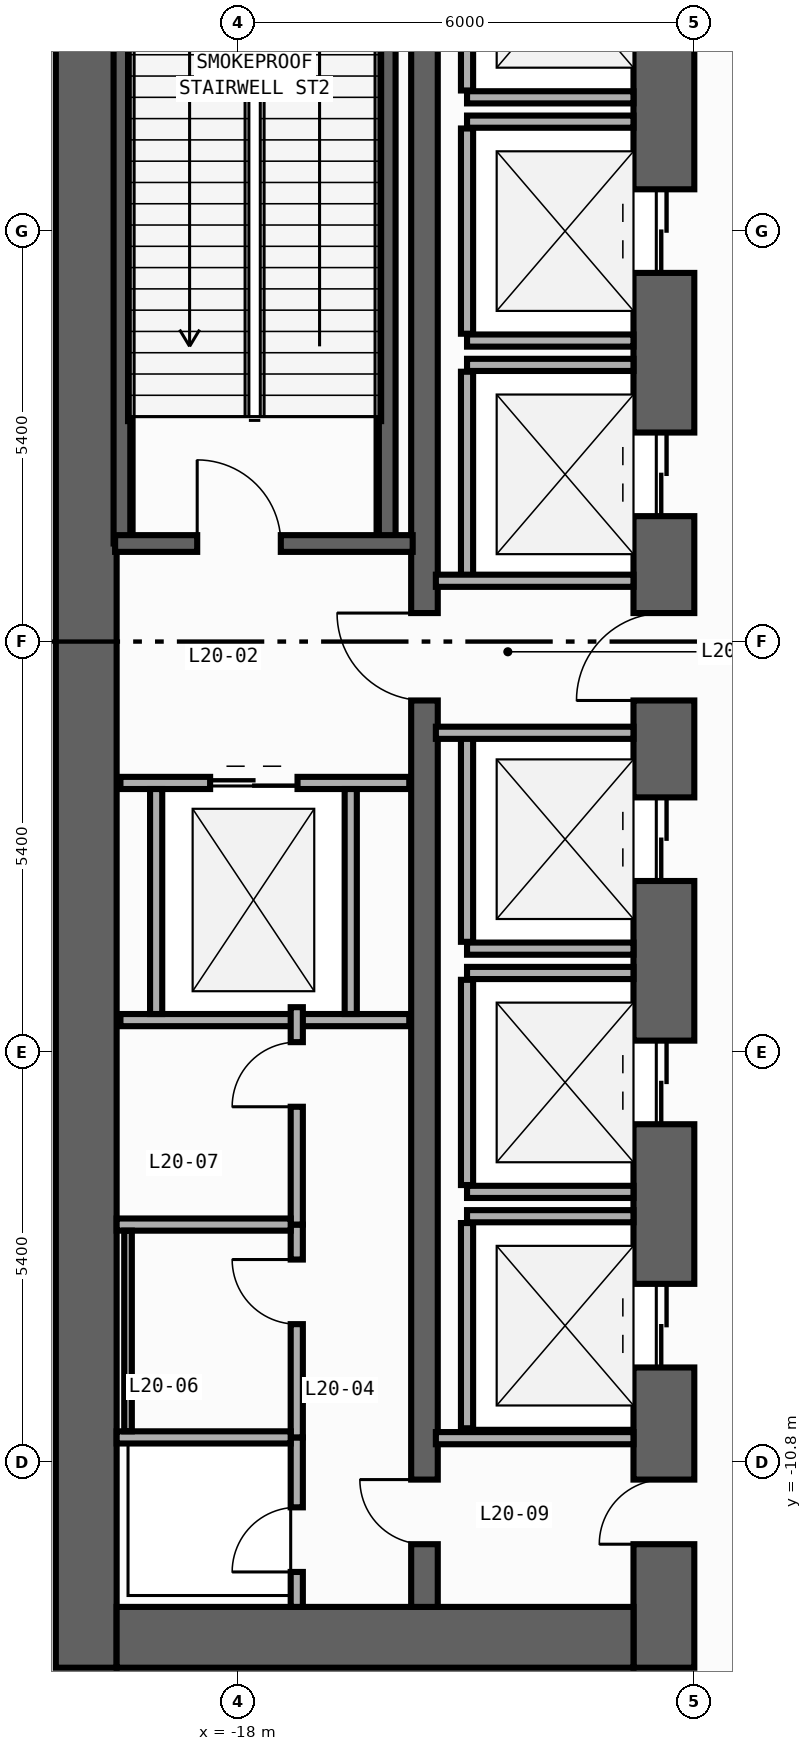
"""IFC4 building model, lengths in metres.
Left out: names, types, materials, properties, quantities, classifications, styles, units other than length and angle.
Written with IfcOpenShell. Run it as: python <this file> out.ifc"""

import sys

from ifc_helpers import new_model, si_unit, direction, frame, frame_2d, origin, place, context, subcontext, project, spatial, rectangle, extrude, element, fill, save


model = new_model("IFC4")
c1 = context("Model", 3, precision=1e-05, world=origin(), true_north=direction((0.0, 1.0)))
c2 = subcontext(c1, "Body", "Model", "MODEL_VIEW")
j1 = project(units=[si_unit("LENGTHUNIT", "METRE"), si_unit("PLANEANGLEUNIT", "RADIAN")], contexts=[c1])
p1 = place(None, origin())
s1 = spatial("IfcSite", under=j1, at=p1, CompositionType="ELEMENT")
p2 = place(p1, origin())
s2 = spatial("IfcBuilding", under=s1, at=p2, CompositionType="ELEMENT")
p3 = place(p2, frame((0.0, 0.0, 84.8)))
s3 = spatial("IfcBuildingStorey", under=s2, at=p3, CompositionType="ELEMENT", Elevation=84.8)
p4 = place(p3, frame((-20.0, -13.5, 0.0), z_axis=(0.0, 0.0, 1.0), x_axis=(0.0, 1.0, 0.0)))
e1 = element("IfcWall", 1, at=p4, inside=s3, PredefinedType="SHEAR", context=c2, shape_type="SweptSolid", body=[
    extrude(rectangle(XDim=27.0, YDim=0.8, at=frame_2d((13.5, 0.0))), origin(), (0.0, 0.0, 1.0), 8.14),
])
p5 = place(p3, frame((-12.4, -13.5, 0.0), z_axis=(0.0, 0.0, 1.0), x_axis=(0.0, 1.0, 0.0)))
e2 = element("IfcWall", 2, at=p5, inside=s3, PredefinedType="SHEAR", context=c2, shape_type="SweptSolid", body=[
    extrude(rectangle(XDim=27.0, YDim=0.8, at=frame_2d((13.5, 0.0))), origin(), (0.0, 0.0, 1.0), 8.14),
])
p6 = place(p5, frame((21.55, 0.0, 0.0)))
e3 = element("IfcOpeningElement", 3, at=p6, cuts=e2, PredefinedType="OPENING", context=c2, shape_type="SweptSolid", body=[
    extrude(rectangle(XDim=1.1, YDim=2.2, at=frame_2d((0.55, 1.1))), frame((0.0, 0.41, 0.0), z_axis=(0.0, -1.0, 0.0), x_axis=(1.0, 0.0, 0.0)), (0.0, 0.0, 1.0), 0.82),
])
p7 = place(p5, frame((18.35, 0.0, 0.0)))
e4 = element("IfcOpeningElement", 4, at=p7, cuts=e2, PredefinedType="OPENING", context=c2, shape_type="SweptSolid", body=[
    extrude(rectangle(XDim=1.1, YDim=2.2, at=frame_2d((0.55, 1.1))), frame((0.0, 0.41, 0.0), z_axis=(0.0, -1.0, 0.0), x_axis=(1.0, 0.0, 0.0)), (0.0, 0.0, 1.0), 0.82),
])
p8 = place(p5, frame((15.15, 0.0, 0.0)))
e5 = element("IfcOpeningElement", 5, at=p8, cuts=e2, PredefinedType="OPENING", context=c2, shape_type="SweptSolid", body=[
    extrude(rectangle(XDim=1.1, YDim=2.2, at=frame_2d((0.55, 1.1))), frame((0.0, 0.41, 0.0), z_axis=(0.0, -1.0, 0.0), x_axis=(1.0, 0.0, 0.0)), (0.0, 0.0, 1.0), 0.82),
])
p9 = place(p5, frame((10.35, 0.0, 0.0)))
e6 = element("IfcOpeningElement", 6, at=p9, cuts=e2, PredefinedType="OPENING", context=c2, shape_type="SweptSolid", body=[
    extrude(rectangle(XDim=1.1, YDim=2.2, at=frame_2d((0.55, 1.1))), frame((0.0, 0.41, 0.0), z_axis=(0.0, -1.0, 0.0), x_axis=(1.0, 0.0, 0.0)), (0.0, 0.0, 1.0), 0.82),
])
p10 = place(p5, frame((7.15, 0.0, 0.0)))
e7 = element("IfcOpeningElement", 7, at=p10, cuts=e2, PredefinedType="OPENING", context=c2, shape_type="SweptSolid", body=[
    extrude(rectangle(XDim=1.1, YDim=2.2, at=frame_2d((0.55, 1.1))), frame((0.0, 0.41, 0.0), z_axis=(0.0, -1.0, 0.0), x_axis=(1.0, 0.0, 0.0)), (0.0, 0.0, 1.0), 0.82),
])
p11 = place(p5, frame((3.95, 0.0, 0.0)))
e8 = element("IfcOpeningElement", 8, at=p11, cuts=e2, PredefinedType="OPENING", context=c2, shape_type="SweptSolid", body=[
    extrude(rectangle(XDim=1.1, YDim=2.2, at=frame_2d((0.55, 1.1))), frame((0.0, 0.41, 0.0), z_axis=(0.0, -1.0, 0.0), x_axis=(1.0, 0.0, 0.0)), (0.0, 0.0, 1.0), 0.82),
])
p12 = place(p5, frame((12.725, 0.0, 0.0)))
e9 = element("IfcOpeningElement", 9, at=p12, cuts=e2, PredefinedType="OPENING", context=c2, shape_type="SweptSolid", body=[
    extrude(rectangle(XDim=1.15, YDim=2.2, at=frame_2d((0.575, 1.1))), frame((0.0, 0.41, 0.0), z_axis=(0.0, -1.0, 0.0), x_axis=(1.0, 0.0, 0.0)), (0.0, 0.0, 1.0), 0.82),
])
p13 = place(p5, frame((1.625, 0.0, 0.0)))
e10 = element("IfcOpeningElement", 10, at=p13, cuts=e2, PredefinedType="OPENING", context=c2, shape_type="SweptSolid", body=[
    extrude(rectangle(XDim=0.85, YDim=2.1, at=frame_2d((0.425, 1.05))), frame((0.0, 0.41, 0.0), z_axis=(0.0, -1.0, 0.0), x_axis=(1.0, 0.0, 0.0)), (0.0, 0.0, 1.0), 0.82),
])
p14 = place(p3, frame((-19.6, -13.1, 0.0), z_axis=(0.0, 0.0, 1.0), x_axis=(1.0, 0.0, 0.0)))
e11 = element("IfcWall", 11, at=p14, inside=s3, PredefinedType="SHEAR", context=c2, shape_type="SweptSolid", body=[
    extrude(rectangle(XDim=6.8, YDim=0.8, at=frame_2d((3.4, 0.0))), origin(), (0.0, 0.0, 1.0), 8.14),
])
p15 = place(p3, frame((-15.55, -12.7, 0.0), z_axis=(0.0, 0.0, 1.0), x_axis=(0.0, 1.0, 0.0)))
e12 = element("IfcWall", 12, at=p15, inside=s3, PredefinedType="SHEAR", context=c2, shape_type="SweptSolid", body=[
    extrude(rectangle(XDim=25.4, YDim=0.35, at=frame_2d((12.7, 0.0))), origin(), (0.0, 0.0, 1.0), 8.14),
])
p16 = place(p15, frame((11.925, 0.0, 0.0)))
e13 = element("IfcOpeningElement", 13, at=p16, cuts=e12, PredefinedType="OPENING", context=c2, shape_type="SweptSolid", body=[
    extrude(rectangle(XDim=1.15, YDim=2.2, at=frame_2d((0.575, 1.1))), frame((0.0, 0.185, 0.0), z_axis=(0.0, -1.0, 0.0), x_axis=(1.0, 0.0, 0.0)), (0.0, 0.0, 1.0), 0.37),
])
p17 = place(p15, frame((0.825, 0.0, 0.0)))
e14 = element("IfcOpeningElement", 14, at=p17, cuts=e12, PredefinedType="OPENING", context=c2, shape_type="SweptSolid", body=[
    extrude(rectangle(XDim=0.85, YDim=2.1, at=frame_2d((0.425, 1.05))), frame((0.0, 0.185, 0.0), z_axis=(0.0, -1.0, 0.0), x_axis=(1.0, 0.0, 0.0)), (0.0, 0.0, 1.0), 0.37),
])
for number, where, z_axis, x_axis in (
    (15, (-16.04, 1.29, 0.0), (0.0, 0.0, 1.0), (0.0, 1.0, 0.0)),
    (16, (-19.53, 1.29, 0.0), (0.0, 0.0, 1.0), (0.0, 1.0, 0.0)),
):
    element("IfcWall", number, at=place(p3, frame(where, z_axis=z_axis, x_axis=x_axis)), inside=s3, PredefinedType="SHEAR", context=c2, shape_type="SweptSolid", body=[
        extrude(rectangle(XDim=11.3, YDim=0.22, at=frame_2d((5.65, 0.0))), origin(), (0.0, 0.0, 1.0), 8.14),
    ])
p18 = place(p3, frame((-19.62, 1.29, 0.0), z_axis=(0.0, 0.0, 1.0), x_axis=(1.0, 0.0, 0.0)))
e17 = element("IfcWall", 17, at=p18, inside=s3, PredefinedType="SHEAR", context=c2, shape_type="SweptSolid", body=[
    extrude(rectangle(XDim=3.915, YDim=0.22, at=frame_2d((1.958, 0.0))), origin(), (0.0, 0.0, 1.0), 8.14),
])
p19 = place(p18, frame((1.08, 0.0, 0.0)))
e18 = element("IfcOpeningElement", 18, at=p19, cuts=e17, PredefinedType="OPENING", context=c2, shape_type="SweptSolid", body=[
    extrude(rectangle(XDim=1.1, YDim=2.2, at=frame_2d((0.55, 1.1))), frame((0.0, 0.12, 0.0), z_axis=(0.0, -1.0, 0.0), x_axis=(1.0, 0.0, 0.0)), (0.0, 0.0, 1.0), 0.24),
])
p20 = place(p3, frame((-14.99, 7.16, 0.0), z_axis=(0.0, 0.0, 1.0), x_axis=(1.0, 0.0, 0.0)))
e19 = element("IfcWall", 19, at=p20, inside=s3, PredefinedType="STANDARD", context=c2, shape_type="SweptSolid", body=[
    extrude(rectangle(XDim=2.19, YDim=0.16, at=frame_2d((1.095, 0.0))), origin(), (0.0, 0.0, 1.0), 8.14),
])
p21 = place(p3, frame((-14.99, 7.25, 0.0), z_axis=(0.0, 0.0, 1.0), x_axis=(0.0, 1.0, 0.0)))
e20 = element("IfcWall", 20, at=p21, inside=s3, PredefinedType="STANDARD", context=c2, shape_type="SweptSolid", body=[
    extrude(rectangle(XDim=2.7, YDim=0.16, at=frame_2d((1.35, 0.0))), origin(), (0.0, 0.0, 1.0), 8.14),
])
for number, where, z_axis, x_axis in (
    (21, (-14.99, 3.96, 0.0), (0.0, 0.0, 1.0), (1.0, 0.0, 0.0)),
    (22, (-14.99, 6.84, 0.0), (0.0, 0.0, 1.0), (1.0, 0.0, 0.0)),
):
    element("IfcWall", number, at=place(p3, frame(where, z_axis=z_axis, x_axis=x_axis)), inside=s3, PredefinedType="STANDARD", context=c2, shape_type="SweptSolid", body=[
        extrude(rectangle(XDim=2.19, YDim=0.16, at=frame_2d((1.095, 0.0))), origin(), (0.0, 0.0, 1.0), 8.14),
    ])
p22 = place(p3, frame((-14.99, 4.05, 0.0), z_axis=(0.0, 0.0, 1.0), x_axis=(0.0, 1.0, 0.0)))
e23 = element("IfcWall", 23, at=p22, inside=s3, PredefinedType="STANDARD", context=c2, shape_type="SweptSolid", body=[
    extrude(rectangle(XDim=2.7, YDim=0.16, at=frame_2d((1.35, 0.0))), origin(), (0.0, 0.0, 1.0), 8.14),
])
p23 = place(p3, frame((-14.99, 3.64, 0.0), z_axis=(0.0, 0.0, 1.0), x_axis=(1.0, 0.0, 0.0)))
e24 = element("IfcWall", 24, at=p23, inside=s3, PredefinedType="STANDARD", context=c2, shape_type="SweptSolid", body=[
    extrude(rectangle(XDim=2.19, YDim=0.16, at=frame_2d((1.095, 0.0))), origin(), (0.0, 0.0, 1.0), 8.14),
])
p24 = place(p3, frame((-14.99, 0.85, 0.0), z_axis=(0.0, 0.0, 1.0), x_axis=(0.0, 1.0, 0.0)))
e25 = element("IfcWall", 25, at=p24, inside=s3, PredefinedType="STANDARD", context=c2, shape_type="SweptSolid", body=[
    extrude(rectangle(XDim=2.7, YDim=0.16, at=frame_2d((1.35, 0.0))), origin(), (0.0, 0.0, 1.0), 8.14),
])
p25 = place(p3, frame((-14.99, -4.04, 0.0), z_axis=(0.0, 0.0, 1.0), x_axis=(1.0, 0.0, 0.0)))
e26 = element("IfcWall", 26, at=p25, inside=s3, PredefinedType="STANDARD", context=c2, shape_type="SweptSolid", body=[
    extrude(rectangle(XDim=2.19, YDim=0.16, at=frame_2d((1.095, 0.0))), origin(), (0.0, 0.0, 1.0), 8.14),
])
p26 = place(p3, frame((-14.99, -3.95, 0.0), z_axis=(0.0, 0.0, 1.0), x_axis=(0.0, 1.0, 0.0)))
e27 = element("IfcWall", 27, at=p26, inside=s3, PredefinedType="STANDARD", context=c2, shape_type="SweptSolid", body=[
    extrude(rectangle(XDim=2.7, YDim=0.16, at=frame_2d((1.35, 0.0))), origin(), (0.0, 0.0, 1.0), 8.14),
])
for number, where, z_axis, x_axis in (
    (28, (-14.99, -7.24, 0.0), (0.0, 0.0, 1.0), (1.0, 0.0, 0.0)),
    (29, (-14.99, -4.36, 0.0), (0.0, 0.0, 1.0), (1.0, 0.0, 0.0)),
):
    element("IfcWall", number, at=place(p3, frame(where, z_axis=z_axis, x_axis=x_axis)), inside=s3, PredefinedType="STANDARD", context=c2, shape_type="SweptSolid", body=[
        extrude(rectangle(XDim=2.19, YDim=0.16, at=frame_2d((1.095, 0.0))), origin(), (0.0, 0.0, 1.0), 8.14),
    ])
p27 = place(p3, frame((-14.99, -7.15, 0.0), z_axis=(0.0, 0.0, 1.0), x_axis=(0.0, 1.0, 0.0)))
e30 = element("IfcWall", 30, at=p27, inside=s3, PredefinedType="STANDARD", context=c2, shape_type="SweptSolid", body=[
    extrude(rectangle(XDim=2.7, YDim=0.16, at=frame_2d((1.35, 0.0))), origin(), (0.0, 0.0, 1.0), 8.14),
])
p28 = place(p3, frame((-14.99, -7.56, 0.0), z_axis=(0.0, 0.0, 1.0), x_axis=(1.0, 0.0, 0.0)))
e31 = element("IfcWall", 31, at=p28, inside=s3, PredefinedType="STANDARD", context=c2, shape_type="SweptSolid", body=[
    extrude(rectangle(XDim=2.19, YDim=0.16, at=frame_2d((1.095, 0.0))), origin(), (0.0, 0.0, 1.0), 8.14),
])
p29 = place(p3, frame((-14.99, -10.35, 0.0), z_axis=(0.0, 0.0, 1.0), x_axis=(0.0, 1.0, 0.0)))
e32 = element("IfcWall", 32, at=p29, inside=s3, PredefinedType="STANDARD", context=c2, shape_type="SweptSolid", body=[
    extrude(rectangle(XDim=2.7, YDim=0.16, at=frame_2d((1.35, 0.0))), origin(), (0.0, 0.0, 1.0), 8.14),
])
p30 = place(p3, frame((-19.55, -1.86, 0.0), z_axis=(0.0, 0.0, 1.0), x_axis=(1.0, 0.0, 0.0)))
e33 = element("IfcWall", 33, at=p30, inside=s3, PredefinedType="STANDARD", context=c2, shape_type="SweptSolid", body=[
    extrude(rectangle(XDim=3.8, YDim=0.16, at=frame_2d((1.9, 0.0))), origin(), (0.0, 0.0, 1.0), 8.14),
])
p31 = place(p30, frame((1.18, 0.0, 0.0)))
e34 = element("IfcOpeningElement", 34, at=p31, cuts=e33, PredefinedType="OPENING", context=c2, shape_type="SweptSolid", body=[
    extrude(rectangle(XDim=1.15, YDim=2.2, at=frame_2d((0.575, 1.1))), frame((0.0, 0.09, 0.0), z_axis=(0.0, -1.0, 0.0), x_axis=(1.0, 0.0, 0.0)), (0.0, 0.0, 1.0), 0.18),
])
p32 = place(p3, frame((-19.55, -4.98, 0.0), z_axis=(0.0, 0.0, 1.0), x_axis=(1.0, 0.0, 0.0)))
e35 = element("IfcWall", 35, at=p32, inside=s3, PredefinedType="STANDARD", context=c2, shape_type="SweptSolid", body=[
    extrude(rectangle(XDim=3.8, YDim=0.16, at=frame_2d((1.9, 0.0))), origin(), (0.0, 0.0, 1.0), 8.14),
])
for number, where, z_axis, x_axis in (
    (36, (-19.08, -4.9, 0.0), (0.0, 0.0, 1.0), (0.0, 1.0, 0.0)),
    (37, (-16.52, -4.9, 0.0), (0.0, 0.0, 1.0), (0.0, 1.0, 0.0)),
):
    element("IfcWall", number, at=place(p3, frame(where, z_axis=z_axis, x_axis=x_axis)), inside=s3, PredefinedType="STANDARD", context=c2, shape_type="SweptSolid", body=[
        extrude(rectangle(XDim=2.96, YDim=0.16, at=frame_2d((1.48, 0.0))), origin(), (0.0, 0.0, 1.0), 8.14),
    ])
for number, where, z_axis, x_axis in (
    (38, (-15.4, 0.8, 0.0), (0.0, 0.0, 1.0), (1.0, 0.0, 0.0)),
    (39, (-15.4, -1.2, 0.0), (0.0, 0.0, 1.0), (1.0, 0.0, 0.0)),
    (40, (-15.4, -10.48, 0.0), (0.0, 0.0, 1.0), (1.0, 0.0, 0.0)),
):
    element("IfcWall", number, at=place(p3, frame(where, z_axis=z_axis, x_axis=x_axis)), inside=s3, PredefinedType="STANDARD", context=c2, shape_type="SweptSolid", body=[
        extrude(rectangle(XDim=2.6, YDim=0.16, at=frame_2d((1.3, 0.0))), origin(), (0.0, 0.0, 1.0), 8.14),
    ])
p33 = place(p3, frame((-17.23, -12.7, 0.0), z_axis=(0.0, 0.0, 1.0), x_axis=(0.0, 1.0, 0.0)))
e41 = element("IfcWall", 41, at=p33, inside=s3, PredefinedType="PARTITIONING", context=c2, shape_type="SweptSolid", body=[
    extrude(rectangle(XDim=2.23, YDim=0.16, at=frame_2d((1.115, 0.0))), origin(), (0.0, 0.0, 1.0), 8.14),
])
p34 = place(p33, frame((0.46, 0.0, 0.0)))
e42 = element("IfcOpeningElement", 42, at=p34, cuts=e41, PredefinedType="OPENING", context=c2, shape_type="SweptSolid", body=[
    extrude(rectangle(XDim=0.85, YDim=2.1, at=frame_2d((0.425, 1.05))), frame((0.0, 0.09, 0.0), z_axis=(0.0, -1.0, 0.0), x_axis=(1.0, 0.0, 0.0)), (0.0, 0.0, 1.0), 0.18),
])
p35 = place(p3, frame((-17.23, -10.47, 0.0), z_axis=(0.0, 0.0, 1.0), x_axis=(0.0, 1.0, 0.0)))
e43 = element("IfcWall", 43, at=p35, inside=s3, PredefinedType="PARTITIONING", context=c2, shape_type="SweptSolid", body=[
    extrude(rectangle(XDim=2.8, YDim=0.16, at=frame_2d((1.4, 0.0))), origin(), (0.0, 0.0, 1.0), 8.14),
])
p36 = place(p35, frame((1.49, 0.0, 0.0)))
e44 = element("IfcOpeningElement", 44, at=p36, cuts=e43, PredefinedType="OPENING", context=c2, shape_type="SweptSolid", body=[
    extrude(rectangle(XDim=0.85, YDim=2.1, at=frame_2d((0.425, 1.05))), frame((0.0, 0.09, 0.0), z_axis=(0.0, -1.0, 0.0), x_axis=(1.0, 0.0, 0.0)), (0.0, 0.0, 1.0), 0.18),
])
p37 = place(p3, frame((-17.23, -7.67, 0.0), z_axis=(0.0, 0.0, 1.0), x_axis=(0.0, 1.0, 0.0)))
e45 = element("IfcWall", 45, at=p37, inside=s3, PredefinedType="PARTITIONING", context=c2, shape_type="SweptSolid", body=[
    extrude(rectangle(XDim=2.86, YDim=0.16, at=frame_2d((1.43, 0.0))), origin(), (0.0, 0.0, 1.0), 8.14),
])
p38 = place(p37, frame((1.55, 0.0, 0.0)))
e46 = element("IfcOpeningElement", 46, at=p38, cuts=e45, PredefinedType="OPENING", context=c2, shape_type="SweptSolid", body=[
    extrude(rectangle(XDim=0.85, YDim=2.1, at=frame_2d((0.425, 1.05))), frame((0.0, 0.09, 0.0), z_axis=(0.0, -1.0, 0.0), x_axis=(1.0, 0.0, 0.0)), (0.0, 0.0, 1.0), 0.18),
])
for number, where, z_axis, x_axis in (
    (47, (-19.6, -10.47, 0.0), (0.0, 0.0, 1.0), (1.0, 0.0, 0.0)),
    (48, (-19.6, -7.67, 0.0), (0.0, 0.0, 1.0), (1.0, 0.0, 0.0)),
):
    element("IfcWall", number, at=place(p3, frame(where, z_axis=z_axis, x_axis=x_axis)), inside=s3, PredefinedType="PARTITIONING", context=c2, shape_type="SweptSolid", body=[
        extrude(rectangle(XDim=2.29, YDim=0.16, at=frame_2d((1.145, 0.0))), origin(), (0.0, 0.0, 1.0), 8.14),
    ])
p39 = place(p3, frame((-19.45, -10.39, 0.0), z_axis=(0.0, 0.0, 1.0), x_axis=(0.0, 1.0, 0.0)))
e49 = element("IfcWall", 49, at=p39, inside=s3, PredefinedType="PARTITIONING", context=c2, shape_type="SweptSolid", body=[
    extrude(rectangle(XDim=2.64, YDim=0.1, at=frame_2d((1.32, 0.0))), origin(), (0.0, 0.0, 1.0), 8.14),
])
p40 = place(p19, origin())
e50 = element("IfcDoor", 50, at=p40, inside=s3, OperationType="SINGLE_SWING_LEFT", PredefinedType="DOOR", context=c2, shape_type="SweptSolid", body=[
    extrude(rectangle(XDim=1.1, YDim=2.2, at=frame_2d((0.55, 1.1))), frame((0.0, 0.025, 0.0), z_axis=(0.0, -1.0, 0.0), x_axis=(1.0, 0.0, 0.0)), (0.0, 0.0, 1.0), 0.05),
])
fill(e18, e50)
p41 = place(p7, origin())
e51 = element("IfcDoor", 51, at=p41, inside=s3, OperationType="DOUBLE_DOOR_SLIDING", PredefinedType="DOOR", context=c2, shape_type="SweptSolid", body=[
    extrude(rectangle(XDim=1.1, YDim=2.2, at=frame_2d((0.55, 1.1))), frame((0.0, 0.025, 0.0), z_axis=(0.0, -1.0, 0.0), x_axis=(1.0, 0.0, 0.0)), (0.0, 0.0, 1.0), 0.05),
])
fill(e4, e51)
p42 = place(p8, origin())
e52 = element("IfcDoor", 52, at=p42, inside=s3, OperationType="DOUBLE_DOOR_SLIDING", PredefinedType="DOOR", context=c2, shape_type="SweptSolid", body=[
    extrude(rectangle(XDim=1.1, YDim=2.2, at=frame_2d((0.55, 1.1))), frame((0.0, 0.025, 0.0), z_axis=(0.0, -1.0, 0.0), x_axis=(1.0, 0.0, 0.0)), (0.0, 0.0, 1.0), 0.05),
])
fill(e5, e52)
p43 = place(p9, origin())
e53 = element("IfcDoor", 53, at=p43, inside=s3, OperationType="DOUBLE_DOOR_SLIDING", PredefinedType="DOOR", context=c2, shape_type="SweptSolid", body=[
    extrude(rectangle(XDim=1.1, YDim=2.2, at=frame_2d((0.55, 1.1))), frame((0.0, 0.025, 0.0), z_axis=(0.0, -1.0, 0.0), x_axis=(1.0, 0.0, 0.0)), (0.0, 0.0, 1.0), 0.05),
])
fill(e6, e53)
p44 = place(p10, origin())
e54 = element("IfcDoor", 54, at=p44, inside=s3, OperationType="DOUBLE_DOOR_SLIDING", PredefinedType="DOOR", context=c2, shape_type="SweptSolid", body=[
    extrude(rectangle(XDim=1.1, YDim=2.2, at=frame_2d((0.55, 1.1))), frame((0.0, 0.025, 0.0), z_axis=(0.0, -1.0, 0.0), x_axis=(1.0, 0.0, 0.0)), (0.0, 0.0, 1.0), 0.05),
])
fill(e7, e54)
p45 = place(p11, origin())
e55 = element("IfcDoor", 55, at=p45, inside=s3, OperationType="DOUBLE_DOOR_SLIDING", PredefinedType="DOOR", context=c2, shape_type="SweptSolid", body=[
    extrude(rectangle(XDim=1.1, YDim=2.2, at=frame_2d((0.55, 1.1))), frame((0.0, 0.025, 0.0), z_axis=(0.0, -1.0, 0.0), x_axis=(1.0, 0.0, 0.0)), (0.0, 0.0, 1.0), 0.05),
])
fill(e8, e55)
p46 = place(p12, origin())
e56 = element("IfcDoor", 56, at=p46, inside=s3, OperationType="SINGLE_SWING_LEFT", PredefinedType="DOOR", context=c2, shape_type="SweptSolid", body=[
    extrude(rectangle(XDim=1.15, YDim=2.2, at=frame_2d((0.575, 1.1))), frame((0.0, 0.025, 0.0), z_axis=(0.0, -1.0, 0.0), x_axis=(1.0, 0.0, 0.0)), (0.0, 0.0, 1.0), 0.05),
])
fill(e9, e56)
p47 = place(p16, origin())
e57 = element("IfcDoor", 57, at=p47, inside=s3, OperationType="SINGLE_SWING_RIGHT", PredefinedType="DOOR", context=c2, shape_type="SweptSolid", body=[
    extrude(rectangle(XDim=1.15, YDim=2.2, at=frame_2d((0.575, 1.1))), frame((0.0, 0.025, 0.0), z_axis=(0.0, -1.0, 0.0), x_axis=(1.0, 0.0, 0.0)), (0.0, 0.0, 1.0), 0.05),
])
fill(e13, e57)
p48 = place(p13, origin())
e58 = element("IfcDoor", 58, at=p48, inside=s3, OperationType="SINGLE_SWING_LEFT", PredefinedType="DOOR", context=c2, shape_type="SweptSolid", body=[
    extrude(rectangle(XDim=0.85, YDim=2.1, at=frame_2d((0.425, 1.05))), frame((0.0, 0.025, 0.0), z_axis=(0.0, -1.0, 0.0), x_axis=(1.0, 0.0, 0.0)), (0.0, 0.0, 1.0), 0.05),
])
fill(e10, e58)
p49 = place(p17, origin())
e59 = element("IfcDoor", 59, at=p49, inside=s3, OperationType="SINGLE_SWING_RIGHT", PredefinedType="DOOR", context=c2, shape_type="SweptSolid", body=[
    extrude(rectangle(XDim=0.85, YDim=2.1, at=frame_2d((0.425, 1.05))), frame((0.0, 0.025, 0.0), z_axis=(0.0, -1.0, 0.0), x_axis=(1.0, 0.0, 0.0)), (0.0, 0.0, 1.0), 0.05),
])
fill(e14, e59)
p50 = place(p31, origin())
e60 = element("IfcDoor", 60, at=p50, inside=s3, OperationType="DOUBLE_DOOR_SLIDING", PredefinedType="DOOR", context=c2, shape_type="SweptSolid", body=[
    extrude(rectangle(XDim=1.15, YDim=2.2, at=frame_2d((0.575, 1.1))), frame((0.0, 0.025, 0.0), z_axis=(0.0, -1.0, 0.0), x_axis=(1.0, 0.0, 0.0)), (0.0, 0.0, 1.0), 0.05),
])
fill(e34, e60)
p51 = place(p34, origin())
e61 = element("IfcDoor", 61, at=p51, inside=s3, OperationType="SINGLE_SWING_LEFT", PredefinedType="DOOR", context=c2, shape_type="SweptSolid", body=[
    extrude(rectangle(XDim=0.85, YDim=2.1, at=frame_2d((0.425, 1.05))), frame((0.0, 0.025, 0.0), z_axis=(0.0, -1.0, 0.0), x_axis=(1.0, 0.0, 0.0)), (0.0, 0.0, 1.0), 0.05),
])
fill(e42, e61)
p52 = place(p36, origin())
e62 = element("IfcDoor", 62, at=p52, inside=s3, OperationType="SINGLE_SWING_RIGHT", PredefinedType="DOOR", context=c2, shape_type="SweptSolid", body=[
    extrude(rectangle(XDim=0.85, YDim=2.1, at=frame_2d((0.425, 1.05))), frame((0.0, 0.025, 0.0), z_axis=(0.0, -1.0, 0.0), x_axis=(1.0, 0.0, 0.0)), (0.0, 0.0, 1.0), 0.05),
])
fill(e44, e62)
p53 = place(p38, origin())
e63 = element("IfcDoor", 63, at=p53, inside=s3, OperationType="SINGLE_SWING_LEFT", PredefinedType="DOOR", context=c2, shape_type="SweptSolid", body=[
    extrude(rectangle(XDim=0.85, YDim=2.1, at=frame_2d((0.425, 1.05))), frame((0.0, 0.025, 0.0), z_axis=(0.0, -1.0, 0.0), x_axis=(1.0, 0.0, 0.0)), (0.0, 0.0, 1.0), 0.05),
])
fill(e46, e63)
save(model, sys.argv[1])
